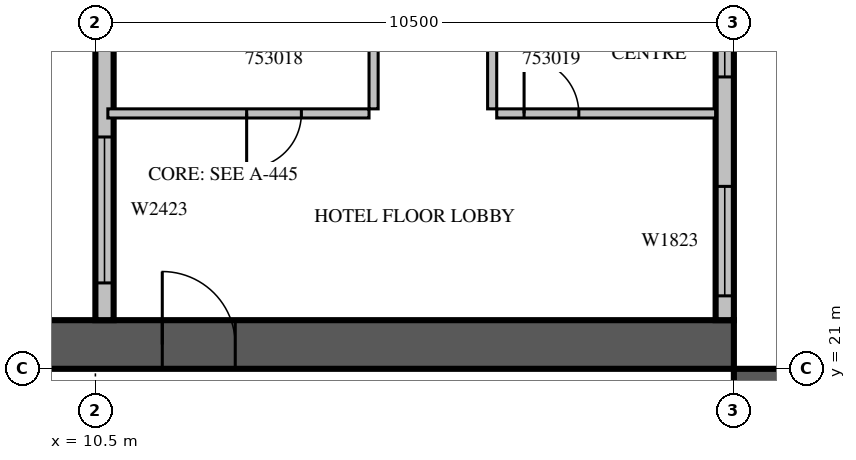
"""IFC4 building model, lengths in metres.
Left out: names, types, materials, properties, quantities, classifications, styles, units other than length and angle.
Written with IfcOpenShell. Run it as: python <this file> out.ifc"""

import sys

from ifc_helpers import new_model, si_unit, direction, frame, frame_2d, origin, place, context, subcontext, project, spatial, rectangle, extrude, source, transform, mapped, element, fill, save


model = new_model("IFC4")
c1 = context("Model", 3, precision=1e-05, world=origin(), true_north=direction((0.0, 1.0)))
c2 = subcontext(c1, "Body", "Model", "MODEL_VIEW")
j1 = project(units=[si_unit("LENGTHUNIT", "METRE"), si_unit("PLANEANGLEUNIT", "RADIAN")], contexts=[c1])
p1 = place(None, origin())
s1 = spatial("IfcSite", under=j1, at=p1, CompositionType="ELEMENT")
p2 = place(p1, origin())
s2 = spatial("IfcBuilding", under=s1, at=p2, CompositionType="ELEMENT")
p3 = place(p2, frame((0.0, 0.0, 234.8)))
s3 = spatial("IfcBuildingStorey", under=s2, at=p3, CompositionType="ELEMENT", Elevation=234.8)
m1 = source(origin(), c2, "Body", "SweptSolid", [
    extrude(rectangle(XDim=16.8, YDim=0.8, at=frame_2d((8.4, 0.0))), origin(), (0.0, 0.0, 1.0), 3.8),
])
p4 = place(p3, frame((21.4, 4.2, 0.0), z_axis=(0.0, 0.0, 1.0), x_axis=(0.0, 1.0, 0.0)))
e1 = element("IfcWall", 1, at=p4, inside=s3, PredefinedType="SHEAR", context=c2, shape_type="MappedRepresentation", body=[
    mapped(m1, transform((0.0, 0.0, 0.0), scale=1.0)),
])
m2 = source(origin(), c2, "Body", "SweptSolid", [
    extrude(rectangle(XDim=2.2, YDim=2.1, at=frame_2d((1.1, 1.05))), frame((0.0, 0.41, 0.0), z_axis=(0.0, -1.0, 0.0), x_axis=(1.0, 0.0, 0.0)), (0.0, 0.0, 1.0), 0.82),
])
p5 = place(p4, frame((4.2, 0.0, 0.0)))
e2 = element("IfcOpeningElement", 2, at=p5, cuts=e1, PredefinedType="OPENING", context=c2, shape_type="MappedRepresentation", body=[
    mapped(m2, transform((0.0, 0.0, 0.0), scale=1.0)),
])
m3 = source(origin(), c2, "Body", "SweptSolid", [
    extrude(rectangle(XDim=1.2, YDim=2.1, at=frame_2d((0.6, 1.05))), frame((0.0, 0.41, 0.0), z_axis=(0.0, -1.0, 0.0), x_axis=(1.0, 0.0, 0.0)), (0.0, 0.0, 1.0), 0.82),
])
p6 = place(p4, frame((14.7, 0.0, 0.0)))
e3 = element("IfcOpeningElement", 3, at=p6, cuts=e1, PredefinedType="OPENING", context=c2, shape_type="MappedRepresentation", body=[
    mapped(m3, transform((0.0, 0.0, 0.0), scale=1.0)),
])
p7 = place(p3, frame((4.2, 21.4, 0.0), z_axis=(0.0, 0.0, 1.0), x_axis=(1.0, 0.0, 0.0)))
e4 = element("IfcWall", 4, at=p7, inside=s3, PredefinedType="SHEAR", context=c2, shape_type="MappedRepresentation", body=[
    mapped(m1, transform((0.0, 0.0, 0.0), scale=1.0)),
])
p8 = place(p7, frame((7.4, 0.0, 0.0)))
e5 = element("IfcOpeningElement", 5, at=p8, cuts=e4, PredefinedType="OPENING", context=c2, shape_type="MappedRepresentation", body=[
    mapped(m3, transform((0.0, 0.0, 0.0), scale=1.0)),
])
m4 = source(origin(), c2, "Body", "SweptSolid", [
    extrude(rectangle(XDim=7.2, YDim=0.3, at=frame_2d((3.6, 0.0))), origin(), (0.0, 0.0, 1.0), 3.4),
])
p9 = place(p3, frame((20.85, 21.8, 0.0), z_axis=(0.0, 0.0, 1.0), x_axis=(0.0, 1.0, 0.0)))
e6 = element("IfcWall", 6, at=p9, inside=s3, PredefinedType="STANDARD", context=c2, shape_type="MappedRepresentation", body=[
    mapped(m4, transform((0.0, 0.0, 0.0), scale=1.0)),
])
m5 = source(origin(), c2, "Body", "SweptSolid", [
    extrude(rectangle(XDim=1.8, YDim=2.3, at=frame_2d((0.9, 1.15))), frame((0.0, 0.16, 0.0), z_axis=(0.0, -1.0, 0.0), x_axis=(1.0, 0.0, 0.0)), (0.0, 0.0, 1.0), 0.32),
])
p10 = place(p9, frame((0.4, 0.0, 0.6)))
e7 = element("IfcOpeningElement", 7, at=p10, cuts=e6, PredefinedType="OPENING", context=c2, shape_type="MappedRepresentation", body=[
    mapped(m5, transform((0.0, 0.0, 0.0), scale=1.0)),
])
m6 = source(origin(), c2, "Body", "SweptSolid", [
    extrude(rectangle(XDim=3.0, YDim=2.3, at=frame_2d((1.5, 1.15))), frame((0.0, 0.16, 0.0), z_axis=(0.0, -1.0, 0.0), x_axis=(1.0, 0.0, 0.0)), (0.0, 0.0, 1.0), 0.32),
])
p11 = place(p9, frame((4.0, 0.0, 0.6)))
e8 = element("IfcOpeningElement", 8, at=p11, cuts=e6, PredefinedType="OPENING", context=c2, shape_type="MappedRepresentation", body=[
    mapped(m6, transform((0.0, 0.0, 0.0), scale=1.0)),
])
p12 = place(p3, frame((10.65, 29.0, 0.0), z_axis=(0.0, 0.0, 1.0), x_axis=(0.0, -1.0, 0.0)))
e9 = element("IfcWall", 9, at=p12, inside=s3, PredefinedType="STANDARD", context=c2, shape_type="MappedRepresentation", body=[
    mapped(m4, transform((0.0, 0.0, 0.0), scale=1.0)),
])
p13 = place(p12, frame((0.2, 0.0, 0.6)))
e10 = element("IfcOpeningElement", 10, at=p13, cuts=e9, PredefinedType="OPENING", context=c2, shape_type="MappedRepresentation", body=[
    mapped(m5, transform((0.0, 0.0, 0.0), scale=1.0)),
])
m7 = source(origin(), c2, "Body", "SweptSolid", [
    extrude(rectangle(XDim=2.4, YDim=2.3, at=frame_2d((1.2, 1.15))), frame((0.0, 0.16, 0.0), z_axis=(0.0, -1.0, 0.0), x_axis=(1.0, 0.0, 0.0)), (0.0, 0.0, 1.0), 0.32),
])
p14 = place(p12, frame((4.188, 0.0, 0.6)))
e11 = element("IfcOpeningElement", 11, at=p14, cuts=e9, PredefinedType="OPENING", context=c2, shape_type="MappedRepresentation", body=[
    mapped(m7, transform((0.0, 0.0, 0.0), scale=1.0)),
])
m8 = source(origin(), c2, "Body", "SweptSolid", [
    extrude(rectangle(XDim=4.295, YDim=0.15, at=frame_2d((2.147, 0.0))), origin(), (0.0, 0.0, 1.0), 3.4),
])
p15 = place(p3, frame((10.705, 25.2, 0.0), z_axis=(0.0, 0.0, 1.0), x_axis=(1.0, 0.0, 0.0)))
e12 = element("IfcWall", 12, at=p15, inside=s3, PredefinedType="PARTITIONING", context=c2, shape_type="MappedRepresentation", body=[
    mapped(m8, transform((0.0, 0.0, 0.0), scale=1.0)),
])
m9 = source(origin(), c2, "Body", "SweptSolid", [
    extrude(rectangle(XDim=0.9, YDim=2.1, at=frame_2d((0.45, 1.05))), frame((0.0, 0.085, 0.0), z_axis=(0.0, -1.0, 0.0), x_axis=(1.0, 0.0, 0.0)), (0.0, 0.0, 1.0), 0.17),
])
p16 = place(p15, frame((2.283, 0.0, 0.0)))
e13 = element("IfcOpeningElement", 13, at=p16, cuts=e12, PredefinedType="OPENING", context=c2, shape_type="MappedRepresentation", body=[
    mapped(m9, transform((0.0, 0.0, 0.0), scale=1.0)),
])
m10 = source(origin(), c2, "Body", "SweptSolid", [
    extrude(rectangle(XDim=3.6, YDim=0.15, at=frame_2d((1.8, 0.0))), origin(), (0.0, 0.0, 1.0), 3.4),
])
p17 = place(p3, frame((17.1, 25.2, 0.0), z_axis=(0.0, 0.0, 1.0), x_axis=(1.0, 0.0, 0.0)))
e14 = element("IfcWall", 14, at=p17, inside=s3, PredefinedType="PARTITIONING", context=c2, shape_type="MappedRepresentation", body=[
    mapped(m10, transform((0.0, 0.0, 0.0), scale=1.0)),
])
p18 = place(p17, frame((0.45, 0.0, 0.0)))
e15 = element("IfcOpeningElement", 15, at=p18, cuts=e14, PredefinedType="OPENING", context=c2, shape_type="MappedRepresentation", body=[
    mapped(m9, transform((0.0, 0.0, 0.0), scale=1.0)),
])
m11 = source(origin(), c2, "Body", "SweptSolid", [
    extrude(rectangle(XDim=4.05, YDim=0.15, at=frame_2d((2.025, 0.0))), origin(), (0.0, 0.0, 1.0), 3.4),
])
for number, where, z_axis, x_axis in (
    (16, (15.075, 25.275, 0.0), (0.0, 0.0, 1.0), (0.0, 1.0, 0.0)),
    (17, (17.025, 29.325, 0.0), (0.0, 0.0, 1.0), (0.0, -1.0, 0.0)),
):
    element("IfcWall", number, at=place(p3, frame(where, z_axis=z_axis, x_axis=x_axis)), inside=s3, PredefinedType="PARTITIONING", context=c2, shape_type="MappedRepresentation", body=[
        mapped(m11, transform((0.0, 0.0, 0.0), scale=1.0)),
    ])
m12 = source(origin(), c2, "Body", "SweptSolid", [
    extrude(rectangle(XDim=1.8, YDim=2.3, at=frame_2d((0.9, 1.15))), frame((0.0, 0.03, 0.0), z_axis=(0.0, -1.0, 0.0), x_axis=(1.0, 0.0, 0.0)), (0.0, 0.0, 1.0), 0.06),
])
p19 = place(p10, origin())
e18 = element("IfcWindow", 18, at=p19, inside=s3, PartitioningType="SINGLE_PANEL", PredefinedType="WINDOW", context=c2, shape_type="MappedRepresentation", body=[
    mapped(m12, transform((0.0, 0.0, 0.0), scale=1.0)),
])
fill(e7, e18)
m13 = source(origin(), c2, "Body", "SweptSolid", [
    extrude(rectangle(XDim=3.0, YDim=2.3, at=frame_2d((1.5, 1.15))), frame((0.0, 0.03, 0.0), z_axis=(0.0, -1.0, 0.0), x_axis=(1.0, 0.0, 0.0)), (0.0, 0.0, 1.0), 0.06),
])
p20 = place(p11, origin())
e19 = element("IfcWindow", 19, at=p20, inside=s3, PartitioningType="SINGLE_PANEL", PredefinedType="WINDOW", context=c2, shape_type="MappedRepresentation", body=[
    mapped(m13, transform((0.0, 0.0, 0.0), scale=1.0)),
])
fill(e8, e19)
m14 = source(origin(), c2, "Body", "SweptSolid", [
    extrude(rectangle(XDim=2.4, YDim=2.3, at=frame_2d((1.2, 1.15))), frame((0.0, 0.03, 0.0), z_axis=(0.0, -1.0, 0.0), x_axis=(1.0, 0.0, 0.0)), (0.0, 0.0, 1.0), 0.06),
])
p21 = place(p14, origin())
e20 = element("IfcWindow", 20, at=p21, inside=s3, PartitioningType="SINGLE_PANEL", PredefinedType="WINDOW", context=c2, shape_type="MappedRepresentation", body=[
    mapped(m14, transform((0.0, 0.0, 0.0), scale=1.0)),
])
fill(e11, e20)
m15 = source(origin(), c2, "Body", "SweptSolid", [
    extrude(rectangle(XDim=1.2, YDim=2.1, at=frame_2d((0.6, 1.05))), frame((0.0, 0.025, 0.0), z_axis=(0.0, -1.0, 0.0), x_axis=(1.0, 0.0, 0.0)), (0.0, 0.0, 1.0), 0.05),
])
p22 = place(p8, origin())
e21 = element("IfcDoor", 21, at=p22, inside=s3, OperationType="SINGLE_SWING_LEFT", PredefinedType="DOOR", context=c2, shape_type="MappedRepresentation", body=[
    mapped(m15, transform((0.0, 0.0, 0.0), scale=1.0)),
])
fill(e5, e21)
m16 = source(origin(), c2, "Body", "SweptSolid", [
    extrude(rectangle(XDim=0.9, YDim=2.1, at=frame_2d((0.45, 1.05))), frame((0.0, 0.025, 0.0), z_axis=(0.0, -1.0, 0.0), x_axis=(1.0, 0.0, 0.0)), (0.0, 0.0, 1.0), 0.05),
])
p23 = place(p16, origin())
e22 = element("IfcDoor", 22, at=p23, inside=s3, OperationType="SINGLE_SWING_RIGHT", PredefinedType="DOOR", context=c2, shape_type="MappedRepresentation", body=[
    mapped(m16, transform((0.0, 0.0, 0.0), scale=1.0)),
])
fill(e13, e22)
p24 = place(p18, origin())
e23 = element("IfcDoor", 23, at=p24, inside=s3, OperationType="SINGLE_SWING_LEFT", PredefinedType="DOOR", context=c2, shape_type="MappedRepresentation", body=[
    mapped(m16, transform((0.0, 0.0, 0.0), scale=1.0)),
])
fill(e15, e23)
save(model, sys.argv[1])
